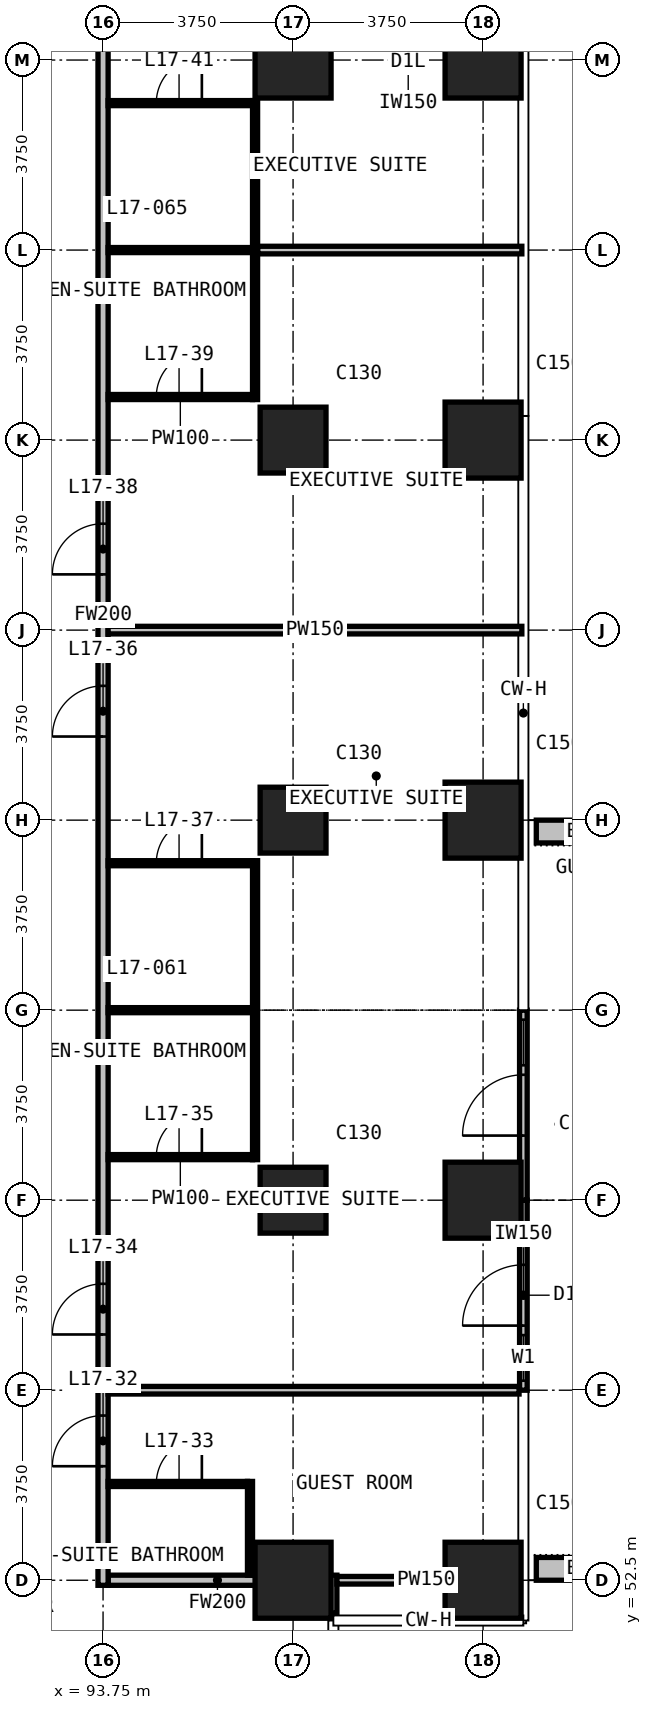
"""IFC4 building model, lengths in metres.
Left out: names, types, materials, properties, quantities, classifications, styles, units other than length and angle.
Written with IfcOpenShell. Run it as: python <this file> out.ifc"""

import sys

from ifc_helpers import new_model, si_unit, direction, frame, frame_2d, origin, origin_2d, place, context, subcontext, project, spatial, rectangle, extrude, element, fill, save


model = new_model("IFC4")
c1 = context("Model", 3, precision=1e-05, world=origin(), true_north=direction((0.0, 1.0)))
c2 = subcontext(c1, "Body", "Model", "MODEL_VIEW")
j1 = project(units=[si_unit("LENGTHUNIT", "METRE"), si_unit("PLANEANGLEUNIT", "RADIAN")], contexts=[c1])
p1 = place(None, origin())
s1 = spatial("IfcSite", under=j1, at=p1, CompositionType="ELEMENT")
p2 = place(p1, origin())
s2 = spatial("IfcBuilding", under=s1, at=p2, CompositionType="ELEMENT")
p3 = place(p2, frame((0.0, 0.0, 75.8)))
s3 = spatial("IfcBuildingStorey", under=s2, at=p3, CompositionType="ELEMENT", Elevation=75.8)
p4 = place(p3, frame((97.5, 52.5, 0.0), z_axis=(0.0, 0.0, 1.0), x_axis=(1.0, 0.0, 0.0)))
e1 = element("IfcColumn", 1, at=p4, inside=s3, PredefinedType="COLUMN", context=c2, shape_type="SweptSolid", body=[
    extrude(rectangle(XDim=1.5, YDim=1.5, at=origin_2d()), origin(), (0.0, 0.0, 1.0), 3.3),
])
for number, where, z_axis, x_axis in (
    (2, (97.5, 60.0, 0.0), (0.0, 0.0, 1.0), (1.0, 0.0, 0.0)),
    (3, (97.5, 67.5, 0.0), (0.0, 0.0, 1.0), (1.0, 0.0, 0.0)),
    (4, (97.5, 75.0, 0.0), (0.0, 0.0, 1.0), (1.0, 0.0, 0.0)),
):
    element("IfcColumn", number, at=place(p3, frame(where, z_axis=z_axis, x_axis=x_axis)), inside=s3, PredefinedType="COLUMN", context=c2, shape_type="SweptSolid", body=[
        extrude(rectangle(XDim=1.3, YDim=1.3, at=origin_2d()), origin(), (0.0, 0.0, 1.0), 3.3),
    ])
for number, where, z_axis, x_axis in (
    (5, (97.5, 82.5, 0.0), (0.0, 0.0, 1.0), (1.0, 0.0, 0.0)),
    (6, (101.25, 52.5, 0.0), (0.0, 0.0, 1.0), (1.0, 0.0, 0.0)),
    (7, (101.25, 60.0, 0.0), (0.0, 0.0, 1.0), (1.0, 0.0, 0.0)),
    (8, (101.25, 67.5, 0.0), (0.0, 0.0, 1.0), (1.0, 0.0, 0.0)),
    (9, (101.25, 75.0, 0.0), (0.0, 0.0, 1.0), (1.0, 0.0, 0.0)),
    (10, (101.25, 82.5, 0.0), (0.0, 0.0, 1.0), (1.0, 0.0, 0.0)),
):
    element("IfcColumn", number, at=place(p3, frame(where, z_axis=z_axis, x_axis=x_axis)), inside=s3, PredefinedType="COLUMN", context=c2, shape_type="SweptSolid", body=[
        extrude(rectangle(XDim=1.5, YDim=1.5, at=origin_2d()), origin(), (0.0, 0.0, 1.0), 3.3),
    ])
p5 = place(p3, frame((102.045, 56.25, 0.0), z_axis=(0.0, 0.0, 1.0), x_axis=(0.0, 1.0, 0.0)))
e11 = element("IfcWall", 11, at=p5, inside=s3, PredefinedType="SOLIDWALL", context=c2, shape_type="SweptSolid", body=[
    extrude(rectangle(XDim=3.75, YDim=0.15, at=frame_2d((1.875, 0.0))), origin(), (0.0, 0.0, 1.0), 3.0),
])
p6 = place(p5, frame((0.188, 0.0, 0.1)))
e12 = element("IfcOpeningElement", 12, at=p6, cuts=e11, PredefinedType="OPENING", context=c2, shape_type="SweptSolid", body=[
    extrude(rectangle(XDim=0.9, YDim=2.4, at=frame_2d((0.45, 1.2))), frame((0.0, 0.085, 0.0), z_axis=(0.0, -1.0, 0.0), x_axis=(1.0, 0.0, 0.0)), (0.0, 0.0, 1.0), 0.17),
])
p7 = place(p5, frame((1.275, 0.0, 0.0)))
e13 = element("IfcOpeningElement", 13, at=p7, cuts=e11, PredefinedType="OPENING", context=c2, shape_type="SweptSolid", body=[
    extrude(rectangle(XDim=1.2, YDim=2.4, at=frame_2d((0.6, 1.2))), frame((0.0, 0.085, 0.0), z_axis=(0.0, -1.0, 0.0), x_axis=(1.0, 0.0, 0.0)), (0.0, 0.0, 1.0), 0.17),
])
p8 = place(p3, frame((102.045, 60.0, 0.0), z_axis=(0.0, 0.0, 1.0), x_axis=(0.0, 1.0, 0.0)))
e14 = element("IfcWall", 14, at=p8, inside=s3, PredefinedType="SOLIDWALL", context=c2, shape_type="SweptSolid", body=[
    extrude(rectangle(XDim=3.75, YDim=0.15, at=frame_2d((1.875, 0.0))), origin(), (0.0, 0.0, 1.0), 3.0),
])
p9 = place(p8, frame((1.275, 0.0, 0.0)))
e15 = element("IfcOpeningElement", 15, at=p9, cuts=e14, PredefinedType="OPENING", context=c2, shape_type="SweptSolid", body=[
    extrude(rectangle(XDim=1.2, YDim=2.4, at=frame_2d((0.6, 1.2))), frame((0.0, 0.085, 0.0), z_axis=(0.0, -1.0, 0.0), x_axis=(1.0, 0.0, 0.0)), (0.0, 0.0, 1.0), 0.17),
])
p10 = place(p8, frame((2.663, 0.0, 0.1)))
e16 = element("IfcOpeningElement", 16, at=p10, cuts=e14, PredefinedType="OPENING", context=c2, shape_type="SweptSolid", body=[
    extrude(rectangle(XDim=0.9, YDim=2.4, at=frame_2d((0.45, 1.2))), frame((0.0, 0.085, 0.0), z_axis=(0.0, -1.0, 0.0), x_axis=(1.0, 0.0, 0.0)), (0.0, 0.0, 1.0), 0.17),
])
for number, where, z_axis, x_axis in (
    (17, (102.3, 52.725, 0.0), (0.0, 0.0, 1.0), (1.0, 0.0, 0.0)),
    (18, (102.3, 67.275, 0.0), (0.0, 0.0, 1.0), (1.0, 0.0, 0.0)),
):
    element("IfcWall", number, at=place(p3, frame(where, z_axis=z_axis, x_axis=x_axis)), inside=s3, PredefinedType="USERDEFINED", context=c2, shape_type="SweptSolid", body=[
        extrude(rectangle(XDim=2.35, YDim=0.45, at=frame_2d((1.175, 0.0))), origin(), (0.0, 0.0, 1.0), 1.1),
    ])
p11 = place(p3, frame((93.85, 52.5, 0.0), z_axis=(0.0, 0.0, 1.0), x_axis=(1.0, 0.0, 0.0)))
e19 = element("IfcWall", 19, at=p11, inside=s3, PredefinedType="PARTITIONING", context=c2, shape_type="SweptSolid", body=[
    extrude(rectangle(XDim=4.315, YDim=0.2, at=frame_2d((2.157, 0.0))), origin(), (0.0, 0.0, 1.0), 3.0),
])
p12 = place(p3, frame((93.75, 52.4, 0.0), z_axis=(0.0, 0.0, 1.0), x_axis=(0.0, 1.0, 0.0)))
e20 = element("IfcWall", 20, at=p12, inside=s3, PredefinedType="PARTITIONING", context=c2, shape_type="SweptSolid", body=[
    extrude(rectangle(XDim=38.31, YDim=0.2, at=frame_2d((19.155, 0.0))), origin(), (0.0, 0.0, 1.0), 3.0),
])
p13 = place(p12, frame((2.35, 0.0, 0.0)))
e21 = element("IfcOpeningElement", 21, at=p13, cuts=e20, PredefinedType="OPENING", context=c2, shape_type="SweptSolid", body=[
    extrude(rectangle(XDim=1.0, YDim=2.2, at=frame_2d((0.5, 1.1))), frame((0.0, 0.11, 0.0), z_axis=(0.0, -1.0, 0.0), x_axis=(1.0, 0.0, 0.0)), (0.0, 0.0, 1.0), 0.22),
])
p14 = place(p12, frame((4.95, 0.0, 0.0)))
e22 = element("IfcOpeningElement", 22, at=p14, cuts=e20, PredefinedType="OPENING", context=c2, shape_type="SweptSolid", body=[
    extrude(rectangle(XDim=1.0, YDim=2.2, at=frame_2d((0.5, 1.1))), frame((0.0, 0.11, 0.0), z_axis=(0.0, -1.0, 0.0), x_axis=(1.0, 0.0, 0.0)), (0.0, 0.0, 1.0), 0.22),
])
p15 = place(p12, frame((16.75, 0.0, 0.0)))
e23 = element("IfcOpeningElement", 23, at=p15, cuts=e20, PredefinedType="OPENING", context=c2, shape_type="SweptSolid", body=[
    extrude(rectangle(XDim=1.0, YDim=2.2, at=frame_2d((0.5, 1.1))), frame((0.0, 0.11, 0.0), z_axis=(0.0, -1.0, 0.0), x_axis=(1.0, 0.0, 0.0)), (0.0, 0.0, 1.0), 0.22),
])
p16 = place(p12, frame((19.95, 0.0, 0.0)))
e24 = element("IfcOpeningElement", 24, at=p16, cuts=e20, PredefinedType="OPENING", context=c2, shape_type="SweptSolid", body=[
    extrude(rectangle(XDim=1.0, YDim=2.2, at=frame_2d((0.5, 1.1))), frame((0.0, 0.11, 0.0), z_axis=(0.0, -1.0, 0.0), x_axis=(1.0, 0.0, 0.0)), (0.0, 0.0, 1.0), 0.22),
])
p17 = place(p12, frame((31.75, 0.0, 0.0)))
e25 = element("IfcOpeningElement", 25, at=p17, cuts=e20, PredefinedType="OPENING", context=c2, shape_type="SweptSolid", body=[
    extrude(rectangle(XDim=1.0, YDim=2.2, at=frame_2d((0.5, 1.1))), frame((0.0, 0.11, 0.0), z_axis=(0.0, -1.0, 0.0), x_axis=(1.0, 0.0, 0.0)), (0.0, 0.0, 1.0), 0.22),
])
p18 = place(p12, frame((35.65, 0.0, 0.0)))
e26 = element("IfcOpeningElement", 26, at=p18, cuts=e20, PredefinedType="OPENING", context=c2, shape_type="SweptSolid", body=[
    extrude(rectangle(XDim=0.9, YDim=2.2, at=frame_2d((0.45, 1.1))), frame((0.0, 0.11, 0.0), z_axis=(0.0, -1.0, 0.0), x_axis=(1.0, 0.0, 0.0)), (0.0, 0.0, 1.0), 0.22),
])
p19 = place(p3, frame((98.265, 51.855, 0.0), z_axis=(0.0, 0.0, 1.0), x_axis=(0.0, 1.0, 0.0)))
e27 = element("IfcWall", 27, at=p19, inside=s3, PredefinedType="PARTITIONING", context=c2, shape_type="SweptSolid", body=[
    extrude(rectangle(XDim=0.745, YDim=0.2, at=frame_2d((0.373, 0.0))), origin(), (0.0, 0.0, 1.0), 3.0),
])
p20 = place(p3, frame((98.365, 52.5, 0.0), z_axis=(0.0, 0.0, 1.0), x_axis=(1.0, 0.0, 0.0)))
e28 = element("IfcWall", 28, at=p20, inside=s3, PredefinedType="PARTITIONING", context=c2, shape_type="SweptSolid", body=[
    extrude(rectangle(XDim=3.53, YDim=0.15, at=frame_2d((1.765, 0.0))), origin(), (0.0, 0.0, 1.0), 3.0),
])
p21 = place(p3, frame((93.85, 56.25, 0.0), z_axis=(0.0, 0.0, 1.0), x_axis=(1.0, 0.0, 0.0)))
e29 = element("IfcWall", 29, at=p21, inside=s3, PredefinedType="PARTITIONING", context=c2, shape_type="SweptSolid", body=[
    extrude(rectangle(XDim=8.11, YDim=0.15, at=frame_2d((4.055, 0.0))), origin(), (0.0, 0.0, 1.0), 3.0),
])
p22 = place(p3, frame((93.85, 71.25, 0.0), z_axis=(0.0, 0.0, 1.0), x_axis=(1.0, 0.0, 0.0)))
e30 = element("IfcWall", 30, at=p22, inside=s3, PredefinedType="PARTITIONING", context=c2, shape_type="SweptSolid", body=[
    extrude(rectangle(XDim=8.165, YDim=0.15, at=frame_2d((4.083, 0.0))), origin(), (0.0, 0.0, 1.0), 3.0),
])
p23 = place(p3, frame((96.8, 78.75, 0.0), z_axis=(0.0, 0.0, 1.0), x_axis=(1.0, 0.0, 0.0)))
e31 = element("IfcWall", 31, at=p23, inside=s3, PredefinedType="PARTITIONING", context=c2, shape_type="SweptSolid", body=[
    extrude(rectangle(XDim=5.215, YDim=0.15, at=frame_2d((2.607, 0.0))), origin(), (0.0, 0.0, 1.0), 3.0),
])
p24 = place(p3, frame((93.85, 54.4, 0.0), z_axis=(0.0, 0.0, 1.0), x_axis=(1.0, 0.0, 0.0)))
e32 = element("IfcWall", 32, at=p24, inside=s3, PredefinedType="PARTITIONING", context=c2, shape_type="SweptSolid", body=[
    extrude(rectangle(XDim=2.75, YDim=0.1, at=frame_2d((1.375, 0.0))), origin(), (0.0, 0.0, 1.0), 3.0),
])
p25 = place(p24, frame((0.95, 0.0, 0.0)))
e33 = element("IfcOpeningElement", 33, at=p25, cuts=e32, PredefinedType="OPENING", context=c2, shape_type="SweptSolid", body=[
    extrude(rectangle(XDim=0.9, YDim=2.2, at=frame_2d((0.45, 1.1))), frame((0.0, 0.06, 0.0), z_axis=(0.0, -1.0, 0.0), x_axis=(1.0, 0.0, 0.0)), (0.0, 0.0, 1.0), 0.12),
])
p26 = place(p3, frame((93.85, 60.85, 0.0), z_axis=(0.0, 0.0, 1.0), x_axis=(1.0, 0.0, 0.0)))
e34 = element("IfcWall", 34, at=p26, inside=s3, PredefinedType="PARTITIONING", context=c2, shape_type="SweptSolid", body=[
    extrude(rectangle(XDim=2.85, YDim=0.1, at=frame_2d((1.425, 0.0))), origin(), (0.0, 0.0, 1.0), 3.0),
])
p27 = place(p26, frame((0.95, 0.0, 0.0)))
e35 = element("IfcOpeningElement", 35, at=p27, cuts=e34, PredefinedType="OPENING", context=c2, shape_type="SweptSolid", body=[
    extrude(rectangle(XDim=0.9, YDim=2.2, at=frame_2d((0.45, 1.1))), frame((0.0, 0.06, 0.0), z_axis=(0.0, -1.0, 0.0), x_axis=(1.0, 0.0, 0.0)), (0.0, 0.0, 1.0), 0.12),
])
p28 = place(p3, frame((93.85, 63.75, 0.0), z_axis=(0.0, 0.0, 1.0), x_axis=(1.0, 0.0, 0.0)))
e36 = element("IfcWall", 36, at=p28, inside=s3, PredefinedType="PARTITIONING", context=c2, shape_type="SweptSolid", body=[
    extrude(rectangle(XDim=2.85, YDim=0.1, at=frame_2d((1.425, 0.0))), origin(), (0.0, 0.0, 1.0), 3.0),
])
p29 = place(p3, frame((93.85, 66.65, 0.0), z_axis=(0.0, 0.0, 1.0), x_axis=(1.0, 0.0, 0.0)))
e37 = element("IfcWall", 37, at=p29, inside=s3, PredefinedType="PARTITIONING", context=c2, shape_type="SweptSolid", body=[
    extrude(rectangle(XDim=2.85, YDim=0.1, at=frame_2d((1.425, 0.0))), origin(), (0.0, 0.0, 1.0), 3.0),
])
p30 = place(p29, frame((0.95, 0.0, 0.0)))
e38 = element("IfcOpeningElement", 38, at=p30, cuts=e37, PredefinedType="OPENING", context=c2, shape_type="SweptSolid", body=[
    extrude(rectangle(XDim=0.9, YDim=2.2, at=frame_2d((0.45, 1.1))), frame((0.0, 0.06, 0.0), z_axis=(0.0, -1.0, 0.0), x_axis=(1.0, 0.0, 0.0)), (0.0, 0.0, 1.0), 0.12),
])
p31 = place(p3, frame((93.85, 75.85, 0.0), z_axis=(0.0, 0.0, 1.0), x_axis=(1.0, 0.0, 0.0)))
e39 = element("IfcWall", 39, at=p31, inside=s3, PredefinedType="PARTITIONING", context=c2, shape_type="SweptSolid", body=[
    extrude(rectangle(XDim=2.85, YDim=0.1, at=frame_2d((1.425, 0.0))), origin(), (0.0, 0.0, 1.0), 3.0),
])
p32 = place(p31, frame((0.95, 0.0, 0.0)))
e40 = element("IfcOpeningElement", 40, at=p32, cuts=e39, PredefinedType="OPENING", context=c2, shape_type="SweptSolid", body=[
    extrude(rectangle(XDim=0.9, YDim=2.2, at=frame_2d((0.45, 1.1))), frame((0.0, 0.06, 0.0), z_axis=(0.0, -1.0, 0.0), x_axis=(1.0, 0.0, 0.0)), (0.0, 0.0, 1.0), 0.12),
])
p33 = place(p3, frame((93.85, 78.75, 0.0), z_axis=(0.0, 0.0, 1.0), x_axis=(1.0, 0.0, 0.0)))
e41 = element("IfcWall", 41, at=p33, inside=s3, PredefinedType="PARTITIONING", context=c2, shape_type="SweptSolid", body=[
    extrude(rectangle(XDim=2.85, YDim=0.1, at=frame_2d((1.425, 0.0))), origin(), (0.0, 0.0, 1.0), 3.0),
])
p34 = place(p3, frame((93.85, 81.65, 0.0), z_axis=(0.0, 0.0, 1.0), x_axis=(1.0, 0.0, 0.0)))
e42 = element("IfcWall", 42, at=p34, inside=s3, PredefinedType="PARTITIONING", context=c2, shape_type="SweptSolid", body=[
    extrude(rectangle(XDim=2.85, YDim=0.1, at=frame_2d((1.425, 0.0))), origin(), (0.0, 0.0, 1.0), 3.0),
])
p35 = place(p34, frame((0.95, 0.0, 0.0)))
e43 = element("IfcOpeningElement", 43, at=p35, cuts=e42, PredefinedType="OPENING", context=c2, shape_type="SweptSolid", body=[
    extrude(rectangle(XDim=0.9, YDim=2.2, at=frame_2d((0.45, 1.1))), frame((0.0, 0.06, 0.0), z_axis=(0.0, -1.0, 0.0), x_axis=(1.0, 0.0, 0.0)), (0.0, 0.0, 1.0), 0.12),
])
p36 = place(p3, frame((96.65, 52.6, 0.0), z_axis=(0.0, 0.0, 1.0), x_axis=(0.0, 1.0, 0.0)))
e44 = element("IfcWall", 44, at=p36, inside=s3, PredefinedType="PARTITIONING", context=c2, shape_type="SweptSolid", body=[
    extrude(rectangle(XDim=1.85, YDim=0.1, at=frame_2d((0.925, 0.0))), origin(), (0.0, 0.0, 1.0), 3.0),
])
for number, where, z_axis, x_axis in (
    (45, (96.75, 60.8, 0.0), (0.0, 0.0, 1.0), (0.0, 1.0, 0.0)),
    (46, (96.75, 75.8, 0.0), (0.0, 0.0, 1.0), (0.0, 1.0, 0.0)),
):
    element("IfcWall", number, at=place(p3, frame(where, z_axis=z_axis, x_axis=x_axis)), inside=s3, PredefinedType="PARTITIONING", context=c2, shape_type="SweptSolid", body=[
        extrude(rectangle(XDim=5.9, YDim=0.1, at=frame_2d((2.95, 0.0))), origin(), (0.0, 0.0, 1.0), 3.0),
    ])
p37 = place(p6, origin())
e47 = element("IfcWindow", 47, at=p37, inside=s3, PartitioningType="SINGLE_PANEL", PredefinedType="WINDOW", context=c2, shape_type="SweptSolid", body=[
    extrude(rectangle(XDim=0.9, YDim=2.4, at=frame_2d((0.45, 1.2))), frame((0.0, 0.03, 0.0), z_axis=(0.0, -1.0, 0.0), x_axis=(1.0, 0.0, 0.0)), (0.0, 0.0, 1.0), 0.06),
])
fill(e12, e47)
p38 = place(p7, origin())
e48 = element("IfcDoor", 48, at=p38, inside=s3, OperationType="SINGLE_SWING_LEFT", PredefinedType="DOOR", context=c2, shape_type="SweptSolid", body=[
    extrude(rectangle(XDim=1.2, YDim=2.4, at=frame_2d((0.6, 1.2))), frame((0.0, 0.025, 0.0), z_axis=(0.0, -1.0, 0.0), x_axis=(1.0, 0.0, 0.0)), (0.0, 0.0, 1.0), 0.05),
])
fill(e13, e48)
p39 = place(p9, origin())
e49 = element("IfcDoor", 49, at=p39, inside=s3, OperationType="SINGLE_SWING_LEFT", PredefinedType="DOOR", context=c2, shape_type="SweptSolid", body=[
    extrude(rectangle(XDim=1.2, YDim=2.4, at=frame_2d((0.6, 1.2))), frame((0.0, 0.025, 0.0), z_axis=(0.0, -1.0, 0.0), x_axis=(1.0, 0.0, 0.0)), (0.0, 0.0, 1.0), 0.05),
])
fill(e15, e49)
p40 = place(p10, origin())
e50 = element("IfcWindow", 50, at=p40, inside=s3, PartitioningType="SINGLE_PANEL", PredefinedType="WINDOW", context=c2, shape_type="SweptSolid", body=[
    extrude(rectangle(XDim=0.9, YDim=2.4, at=frame_2d((0.45, 1.2))), frame((0.0, 0.03, 0.0), z_axis=(0.0, -1.0, 0.0), x_axis=(1.0, 0.0, 0.0)), (0.0, 0.0, 1.0), 0.06),
])
fill(e16, e50)
p41 = place(p13, origin())
e51 = element("IfcDoor", 51, at=p41, inside=s3, OperationType="SINGLE_SWING_RIGHT", PredefinedType="DOOR", context=c2, shape_type="SweptSolid", body=[
    extrude(rectangle(XDim=1.0, YDim=2.2, at=frame_2d((0.5, 1.1))), frame((0.0, 0.025, 0.0), z_axis=(0.0, -1.0, 0.0), x_axis=(1.0, 0.0, 0.0)), (0.0, 0.0, 1.0), 0.05),
])
fill(e21, e51)
p42 = place(p25, origin())
e52 = element("IfcDoor", 52, at=p42, inside=s3, OperationType="SINGLE_SWING_RIGHT", PredefinedType="DOOR", context=c2, shape_type="SweptSolid", body=[
    extrude(rectangle(XDim=0.9, YDim=2.2, at=frame_2d((0.45, 1.1))), frame((0.0, 0.025, 0.0), z_axis=(0.0, -1.0, 0.0), x_axis=(1.0, 0.0, 0.0)), (0.0, 0.0, 1.0), 0.05),
])
fill(e33, e52)
p43 = place(p14, origin())
e53 = element("IfcDoor", 53, at=p43, inside=s3, OperationType="SINGLE_SWING_LEFT", PredefinedType="DOOR", context=c2, shape_type="SweptSolid", body=[
    extrude(rectangle(XDim=1.0, YDim=2.2, at=frame_2d((0.5, 1.1))), frame((0.0, 0.025, 0.0), z_axis=(0.0, -1.0, 0.0), x_axis=(1.0, 0.0, 0.0)), (0.0, 0.0, 1.0), 0.05),
])
fill(e22, e53)
p44 = place(p27, origin())
e54 = element("IfcDoor", 54, at=p44, inside=s3, OperationType="SINGLE_SWING_RIGHT", PredefinedType="DOOR", context=c2, shape_type="SweptSolid", body=[
    extrude(rectangle(XDim=0.9, YDim=2.2, at=frame_2d((0.45, 1.1))), frame((0.0, 0.025, 0.0), z_axis=(0.0, -1.0, 0.0), x_axis=(1.0, 0.0, 0.0)), (0.0, 0.0, 1.0), 0.05),
])
fill(e35, e54)
p45 = place(p15, origin())
e55 = element("IfcDoor", 55, at=p45, inside=s3, OperationType="SINGLE_SWING_RIGHT", PredefinedType="DOOR", context=c2, shape_type="SweptSolid", body=[
    extrude(rectangle(XDim=1.0, YDim=2.2, at=frame_2d((0.5, 1.1))), frame((0.0, 0.025, 0.0), z_axis=(0.0, -1.0, 0.0), x_axis=(1.0, 0.0, 0.0)), (0.0, 0.0, 1.0), 0.05),
])
fill(e23, e55)
p46 = place(p30, origin())
e56 = element("IfcDoor", 56, at=p46, inside=s3, OperationType="SINGLE_SWING_RIGHT", PredefinedType="DOOR", context=c2, shape_type="SweptSolid", body=[
    extrude(rectangle(XDim=0.9, YDim=2.2, at=frame_2d((0.45, 1.1))), frame((0.0, 0.025, 0.0), z_axis=(0.0, -1.0, 0.0), x_axis=(1.0, 0.0, 0.0)), (0.0, 0.0, 1.0), 0.05),
])
fill(e38, e56)
p47 = place(p16, origin())
e57 = element("IfcDoor", 57, at=p47, inside=s3, OperationType="SINGLE_SWING_LEFT", PredefinedType="DOOR", context=c2, shape_type="SweptSolid", body=[
    extrude(rectangle(XDim=1.0, YDim=2.2, at=frame_2d((0.5, 1.1))), frame((0.0, 0.025, 0.0), z_axis=(0.0, -1.0, 0.0), x_axis=(1.0, 0.0, 0.0)), (0.0, 0.0, 1.0), 0.05),
])
fill(e24, e57)
p48 = place(p32, origin())
e58 = element("IfcDoor", 58, at=p48, inside=s3, OperationType="SINGLE_SWING_RIGHT", PredefinedType="DOOR", context=c2, shape_type="SweptSolid", body=[
    extrude(rectangle(XDim=0.9, YDim=2.2, at=frame_2d((0.45, 1.1))), frame((0.0, 0.025, 0.0), z_axis=(0.0, -1.0, 0.0), x_axis=(1.0, 0.0, 0.0)), (0.0, 0.0, 1.0), 0.05),
])
fill(e40, e58)
p49 = place(p35, origin())
e59 = element("IfcDoor", 59, at=p49, inside=s3, OperationType="SINGLE_SWING_RIGHT", PredefinedType="DOOR", context=c2, shape_type="SweptSolid", body=[
    extrude(rectangle(XDim=0.9, YDim=2.2, at=frame_2d((0.45, 1.1))), frame((0.0, 0.025, 0.0), z_axis=(0.0, -1.0, 0.0), x_axis=(1.0, 0.0, 0.0)), (0.0, 0.0, 1.0), 0.05),
])
fill(e43, e59)
save(model, sys.argv[1])
